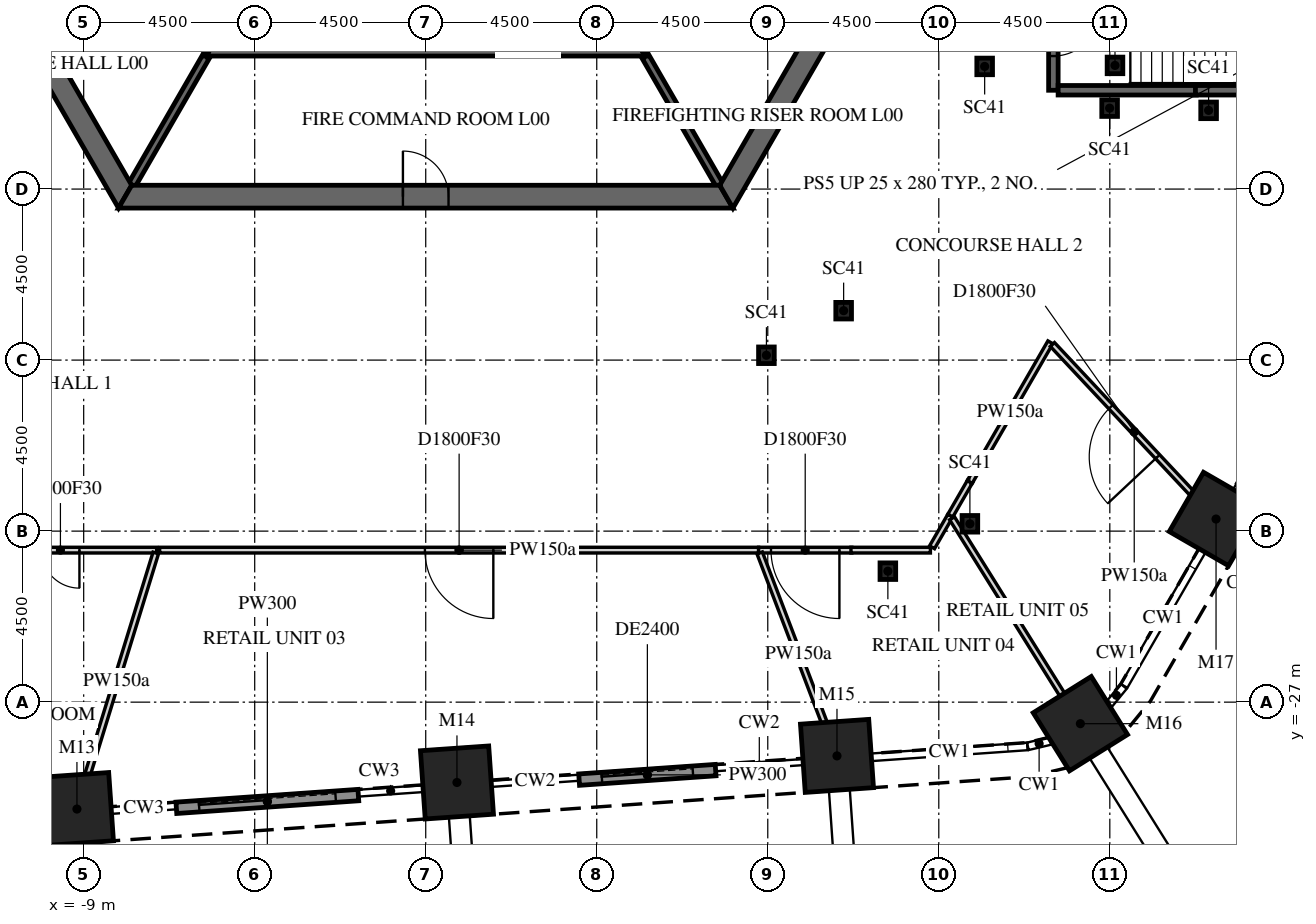
"""IFC4 building model, lengths in metres.
Left out: names, types, materials, properties, quantities, classifications, styles, units other than length and angle.
Written with IfcOpenShell. Run it as: python <this file> out.ifc"""

import sys

from ifc_helpers import new_model, si_unit, direction, frame, frame_2d, origin, origin_2d, place, context, subcontext, project, spatial, polyline, rectangle, i_section, outline, extrude, element, fill, save


model = new_model("IFC4")
c1 = context("Model", 3, precision=1e-05, world=origin(), true_north=direction((0.0, 1.0)))
c2 = subcontext(c1, "Body", "Model", "MODEL_VIEW")
j1 = project(units=[si_unit("LENGTHUNIT", "METRE"), si_unit("PLANEANGLEUNIT", "RADIAN")], contexts=[c1])
p1 = place(None, origin())
s1 = spatial("IfcSite", under=j1, at=p1, CompositionType="ELEMENT")
p2 = place(p1, origin())
s2 = spatial("IfcBuilding", under=s1, at=p2, CompositionType="ELEMENT")
p3 = place(p2, origin())
s3 = spatial("IfcBuildingStorey", under=s2, at=p3, CompositionType="ELEMENT", Elevation=0.0)
for number, where, z_axis, x_axis in (
    (1, (-9.177, -29.813, -2.1), (0.0, 0.0, 1.0), (-0.998, -0.07, 0.0)),
    (2, (0.822, -29.114, -2.1), (0.0, 0.0, 1.0), (-0.998, -0.07, 0.0)),
    (3, (10.821, -28.414, -2.1), (0.0, 0.0, 1.0), (-0.998, -0.07, 0.0)),
    (4, (17.225, -27.566, -2.1), (0.0, 0.0, 1.0), (-0.848, -0.53, 0.0)),
    (5, (20.795, -22.182, -2.1), (0.0, 0.0, 1.0), (-0.5, -0.866, 0.0)),
):
    element("IfcColumn", number, at=place(p3, frame(where, z_axis=z_axis, x_axis=x_axis)), inside=s3, PredefinedType="COLUMN", context=c2, shape_type="SweptSolid", body=[
        extrude(rectangle(XDim=1.8, YDim=1.8, at=origin_2d()), origin(), (0.0, 0.0, 1.0), 10.85),
    ])
for number, where, z_axis, x_axis in (
    (6, (20.599, -11.429, -2.1), (0.0, 0.0, 1.0), (1.0, 0.0, 0.0)),
    (7, (14.318, -22.308, -2.1), (0.0, 0.0, 1.0), (1.0, 0.0, 0.0)),
    (8, (10.996, -16.7, -2.1), (0.0, 0.0, 1.0), (1.0, 0.0, 0.0)),
    (9, (14.707, -10.273, -2.1), (0.0, 0.0, 1.0), (1.0, 0.0, 0.0)),
    (10, (18.136, -10.246, -2.1), (0.0, 0.0, 1.0), (1.0, 0.0, 0.0)),
    (11, (12.16, -23.554, -2.1), (0.0, 0.0, 1.0), (1.0, 0.0, 0.0)),
    (12, (8.965, -17.873, -2.1), (0.0, 0.0, 1.0), (1.0, 0.0, 0.0)),
    (13, (17.995, -11.37, -2.1), (0.0, 0.0, 1.0), (1.0, 0.0, 0.0)),
):
    element("IfcColumn", number, at=place(p3, frame(where, z_axis=z_axis, x_axis=x_axis)), inside=s3, PredefinedType="COLUMN", context=c2, shape_type="SweptSolid", body=[
        extrude(i_section(OverallWidth=0.412, OverallDepth=0.437, WebThickness=0.036, FlangeThickness=0.058, FilletRadius=0.015, at=origin_2d()), origin(), (0.0, 0.0, 1.0), 10.85),
    ])
p4 = place(p3, frame((-6.562, -29.78, 0.0), z_axis=(0.0, 0.0, 1.0), x_axis=(0.997562190208, 0.069783068626, 0.0)))
e14 = element("IfcWall", 14, at=p4, inside=s3, PredefinedType="SOLIDWALL", context=c2, shape_type="SweptSolid", body=[
    extrude(rectangle(XDim=4.8, YDim=0.3, at=frame_2d((2.4, 0.0))), origin(), (0.0, 0.0, 1.0), 7.823),
])
p5 = place(p4, frame((0.6, 0.0, 0.0)))
e15 = element("IfcOpeningElement", 15, at=p5, cuts=e14, PredefinedType="OPENING", context=c2, shape_type="SweptSolid", body=[
    extrude(rectangle(XDim=3.6, YDim=3.6, at=frame_2d((1.8, 1.8))), frame((0.0, 0.16, 0.0), z_axis=(0.0, -1.0, 0.0), x_axis=(1.0, 0.0, 0.0)), (0.0, 0.0, 1.0), 0.32),
])
p6 = place(p3, frame((4.036, -29.039, 0.0), z_axis=(0.0, 0.0, 1.0), x_axis=(0.997566661623, 0.069719119461, 0.0)))
e16 = element("IfcWall", 16, at=p6, inside=s3, PredefinedType="SOLIDWALL", context=c2, shape_type="SweptSolid", body=[
    extrude(rectangle(XDim=3.6, YDim=0.3, at=frame_2d((1.8, 0.0))), origin(), (0.0, 0.0, 1.0), 7.823),
])
p7 = place(p6, frame((0.6, 0.0, 0.0)))
e17 = element("IfcOpeningElement", 17, at=p7, cuts=e16, PredefinedType="OPENING", context=c2, shape_type="SweptSolid", body=[
    extrude(rectangle(XDim=2.4, YDim=3.0, at=frame_2d((1.2, 1.5))), frame((0.0, 0.16, 0.0), z_axis=(0.0, -1.0, 0.0), x_axis=(1.0, 0.0, 0.0)), (0.0, 0.0, 1.0), 0.32),
])
p8 = place(p3, frame((-15.819, 0.0, -2.1), z_axis=(0.0, 0.0, 1.0), x_axis=(0.499999880136, -0.866025472988, 0.0)))
e18 = element("IfcWall", 18, at=p8, inside=s3, PredefinedType="SHEAR", context=c2, shape_type="SweptSolid", body=[
    extrude(outline(polyline([(-0.173, -0.3), (15.993, -0.3), (15.646, 0.3), (0.173, 0.3), (-0.173, -0.3)])), origin(), (0.0, 0.0, 1.0), 10.85),
])
p9 = place(p8, frame((6.981, 0.0, 2.1)))
e19 = element("IfcOpeningElement", 19, at=p9, cuts=e18, PredefinedType="OPENING", context=c2, shape_type="SweptSolid", body=[
    extrude(rectangle(XDim=1.8, YDim=2.4, at=frame_2d((0.9, 1.2))), frame((0.0, 0.31, 0.0), z_axis=(0.0, -1.0, 0.0), x_axis=(1.0, 0.0, 0.0)), (0.0, 0.0, 1.0), 0.62),
])
p10 = place(p3, frame((-7.91, -13.7, -2.1), z_axis=(0.0, 0.0, 1.0), x_axis=(1.0, 0.0, 0.0)))
e20 = element("IfcWall", 20, at=p10, inside=s3, PredefinedType="SHEAR", context=c2, shape_type="SweptSolid", body=[
    extrude(outline(polyline([(-0.173, -0.3), (15.993, -0.3), (15.646, 0.3), (0.173, 0.3), (-0.173, -0.3)])), origin(), (0.0, 0.0, 1.0), 10.85),
])
p11 = place(p10, frame((7.31, 0.0, 2.1)))
e21 = element("IfcOpeningElement", 21, at=p11, cuts=e20, PredefinedType="OPENING", context=c2, shape_type="SweptSolid", body=[
    extrude(rectangle(XDim=1.2, YDim=2.4, at=frame_2d((0.6, 1.2))), frame((0.0, 0.31, 0.0), z_axis=(0.0, -1.0, 0.0), x_axis=(1.0, 0.0, 0.0)), (0.0, 0.0, 1.0), 0.62),
])
p12 = place(p3, frame((7.91, -13.7, -2.1), z_axis=(0.0, 0.0, 1.0), x_axis=(0.499999880136, 0.866025472988, 0.0)))
e22 = element("IfcWall", 22, at=p12, inside=s3, PredefinedType="SHEAR", context=c2, shape_type="SweptSolid", body=[
    extrude(outline(polyline([(-0.173, -0.3), (15.993, -0.3), (15.646, 0.3), (0.173, 0.3), (-0.173, -0.3)])), origin(), (0.0, 0.0, 1.0), 10.85),
])
p13 = place(p12, frame((7.039, 0.0, 2.1)))
e23 = element("IfcOpeningElement", 23, at=p13, cuts=e22, PredefinedType="OPENING", context=c2, shape_type="SweptSolid", body=[
    extrude(rectangle(XDim=1.8, YDim=2.4, at=frame_2d((0.9, 1.2))), frame((0.0, 0.31, 0.0), z_axis=(0.0, -1.0, 0.0), x_axis=(1.0, 0.0, 0.0)), (0.0, 0.0, 1.0), 0.62),
])
p14 = place(p3, frame((-11.345, 0.0, -2.1), z_axis=(0.0, 0.0, 1.0), x_axis=(0.499995046907, -0.866028263435, 0.0)))
e24 = element("IfcWall", 24, at=p14, inside=s3, PredefinedType="SHEAR", context=c2, shape_type="SweptSolid", body=[
    extrude(outline(polyline([(-0.101, -0.175), (11.446, -0.175), (11.244, 0.175), (0.101, 0.175), (-0.101, -0.175)])), origin(), (0.0, 0.0, 1.0), 10.85),
])
p15 = place(p14, frame((4.744, 0.0, 2.1)))
e25 = element("IfcOpeningElement", 25, at=p15, cuts=e24, PredefinedType="OPENING", context=c2, shape_type="SweptSolid", body=[
    extrude(rectangle(XDim=1.8, YDim=2.4, at=frame_2d((0.9, 1.2))), frame((0.0, 0.185, 0.0), z_axis=(0.0, -1.0, 0.0), x_axis=(1.0, 0.0, 0.0)), (0.0, 0.0, 1.0), 0.37),
])
p16 = place(p3, frame((-5.673, -9.825, -2.1), z_axis=(0.0, 0.0, 1.0), x_axis=(1.0, 0.0, 0.0)))
e26 = element("IfcWall", 26, at=p16, inside=s3, PredefinedType="SHEAR", context=c2, shape_type="SweptSolid", body=[
    extrude(outline(polyline([(-0.101, -0.175), (11.446, -0.175), (11.244, 0.175), (0.101, 0.175), (-0.101, -0.175)])), origin(), (0.0, 0.0, 1.0), 10.85),
])
p17 = place(p3, frame((5.673, -9.825, -2.1), z_axis=(0.0, 0.0, 1.0), x_axis=(0.499995046907, 0.866028263435, 0.0)))
e27 = element("IfcWall", 27, at=p17, inside=s3, PredefinedType="SHEAR", context=c2, shape_type="SweptSolid", body=[
    extrude(outline(polyline([(-0.101, -0.175), (11.446, -0.175), (11.244, 0.175), (0.101, 0.175), (-0.101, -0.175)])), origin(), (0.0, 0.0, 1.0), 10.85),
])
p18 = place(p17, frame((4.801, 0.0, 2.1)))
e28 = element("IfcOpeningElement", 28, at=p18, cuts=e27, PredefinedType="OPENING", context=c2, shape_type="SweptSolid", body=[
    extrude(rectangle(XDim=1.8, YDim=2.4, at=frame_2d((0.9, 1.2))), frame((0.0, 0.185, 0.0), z_axis=(0.0, -1.0, 0.0), x_axis=(1.0, 0.0, 0.0)), (0.0, 0.0, 1.0), 0.37),
])
for number, where, z_axis, x_axis in (
    (29, (-5.773, -10.0, -2.1), (0.0, 0.0, 1.0), (-0.5, -0.866, 0.0)),
    (30, (5.773, -10.0, -2.1), (0.0, 0.0, 1.0), (0.5, -0.866, 0.0)),
):
    element("IfcWall", number, at=place(p3, frame(where, z_axis=z_axis, x_axis=x_axis)), inside=s3, PredefinedType="SHEAR", context=c2, shape_type="SweptSolid", body=[
        extrude(rectangle(XDim=3.926, YDim=0.2, at=frame_2d((1.963, 0.0))), origin(), (0.0, 0.0, 1.0), 10.85),
    ])
p19 = place(p3, frame((-7.08, -23.0, 0.0), z_axis=(0.0, 0.0, 1.0), x_axis=(-1.0, 0.0, 0.0)))
e31 = element("IfcWall", 31, at=p19, inside=s3, PredefinedType="PARTITIONING", context=c2, shape_type="SweptSolid", body=[
    extrude(rectangle(XDim=5.064, YDim=0.15, at=frame_2d((2.532, 0.0))), origin(), (0.0, 0.0, 1.0), 8.75),
])
p20 = place(p19, frame((2.032, 0.0, 0.0)))
e32 = element("IfcOpeningElement", 32, at=p20, cuts=e31, PredefinedType="OPENING", context=c2, shape_type="SweptSolid", body=[
    extrude(rectangle(XDim=1.0, YDim=2.1, at=frame_2d((0.5, 1.05))), frame((0.0, 0.085, 0.0), z_axis=(0.0, -1.0, 0.0), x_axis=(1.0, 0.0, 0.0)), (0.0, 0.0, 1.0), 0.17),
])
p21 = place(p3, frame((-9.177, -29.813, 0.0), z_axis=(0.0, 0.0, 1.0), x_axis=(0.294180751952, 0.955749802606, 0.0)))
e33 = element("IfcWall", 33, at=p21, inside=s3, PredefinedType="PARTITIONING", context=c2, shape_type="SweptSolid", body=[
    extrude(rectangle(XDim=7.05, YDim=0.15, at=frame_2d((3.525, 0.0))), origin(), (0.0, 0.0, 1.0), 8.75),
])
p22 = place(p3, frame((8.759, -23.0, 0.0), z_axis=(0.0, 0.0, 1.0), x_axis=(-1.0, 0.0, 0.0)))
e34 = element("IfcWall", 34, at=p22, inside=s3, PredefinedType="PARTITIONING", context=c2, shape_type="SweptSolid", body=[
    extrude(rectangle(XDim=15.76, YDim=0.15, at=frame_2d((7.88, 0.0))), origin(), (0.0, 0.0, 1.0), 8.75),
])
p23 = place(p22, frame((6.98, 0.0, 0.0)))
e35 = element("IfcOpeningElement", 35, at=p23, cuts=e34, PredefinedType="OPENING", context=c2, shape_type="SweptSolid", body=[
    extrude(rectangle(XDim=1.8, YDim=2.1, at=frame_2d((0.9, 1.05))), frame((0.0, 0.085, 0.0), z_axis=(0.0, -1.0, 0.0), x_axis=(1.0, 0.0, 0.0)), (0.0, 0.0, 1.0), 0.17),
])
p24 = place(p3, frame((11.211, -23.0, 0.0), z_axis=(0.0, 0.0, 1.0), x_axis=(-1.0, 0.0, 0.0)))
e36 = element("IfcWall", 36, at=p24, inside=s3, PredefinedType="PARTITIONING", context=c2, shape_type="SweptSolid", body=[
    extrude(rectangle(XDim=2.452, YDim=0.15, at=frame_2d((1.226, 0.0))), origin(), (0.0, 0.0, 1.0), 8.75),
])
p25 = place(p24, frame((0.326, 0.0, 0.0)))
e37 = element("IfcOpeningElement", 37, at=p25, cuts=e36, PredefinedType="OPENING", context=c2, shape_type="SweptSolid", body=[
    extrude(rectangle(XDim=1.8, YDim=2.1, at=frame_2d((0.9, 1.05))), frame((0.0, 0.085, 0.0), z_axis=(0.0, -1.0, 0.0), x_axis=(1.0, 0.0, 0.0)), (0.0, 0.0, 1.0), 0.17),
])
p26 = place(p3, frame((10.821, -28.414, 0.0), z_axis=(0.0, 0.0, 1.0), x_axis=(-0.355918915631, 0.93451684067, 0.0)))
e38 = element("IfcWall", 38, at=p26, inside=s3, PredefinedType="PARTITIONING", context=c2, shape_type="SweptSolid", body=[
    extrude(rectangle(XDim=5.713, YDim=0.15, at=frame_2d((2.856, 0.0))), origin(), (0.0, 0.0, 1.0), 8.75),
])
p27 = place(p3, frame((11.189, -23.0, 0.0), z_axis=(0.0, 0.0, 1.0), x_axis=(1.0, 0.0, 0.0)))
e39 = element("IfcWall", 39, at=p27, inside=s3, PredefinedType="PARTITIONING", context=c2, shape_type="SweptSolid", body=[
    extrude(rectangle(XDim=2.09, YDim=0.15, at=frame_2d((1.045, 0.0))), origin(), (0.0, 0.0, 1.0), 8.75),
])
p28 = place(p3, frame((13.322, -22.925, 0.0), z_axis=(0.0, 0.0, 1.0), x_axis=(0.500146667959, 0.865940708438, 0.0)))
e40 = element("IfcWall", 40, at=p28, inside=s3, PredefinedType="PARTITIONING", context=c2, shape_type="SweptSolid", body=[
    extrude(rectangle(XDim=0.963, YDim=0.15, at=frame_2d((0.481, 0.0))), origin(), (0.0, 0.0, 1.0), 8.75),
])
p29 = place(p3, frame((13.804, -22.091, 0.0), z_axis=(0.0, 0.0, 1.0), x_axis=(0.499824022834, 0.866126980413, 0.0)))
e41 = element("IfcWall", 41, at=p29, inside=s3, PredefinedType="PARTITIONING", context=c2, shape_type="SweptSolid", body=[
    extrude(rectangle(XDim=1.04, YDim=0.15, at=frame_2d((0.52, 0.0))), origin(), (0.0, 0.0, 1.0), 8.75),
])
p30 = place(p3, frame((14.313, -21.209, 0.0), z_axis=(0.0, 0.0, 1.0), x_axis=(0.500022752519, 0.866012267213, 0.0)))
e42 = element("IfcWall", 42, at=p30, inside=s3, PredefinedType="PARTITIONING", context=c2, shape_type="SweptSolid", body=[
    extrude(rectangle(XDim=4.246, YDim=0.15, at=frame_2d((2.123, 0.0))), origin(), (0.0, 0.0, 1.0), 8.75),
])
p31 = place(p3, frame((20.795, -22.182, 0.0), z_axis=(0.0, 0.0, 1.0), x_axis=(-0.683915327737, 0.729561391856, 0.0)))
e43 = element("IfcWall", 43, at=p31, inside=s3, PredefinedType="PARTITIONING", context=c2, shape_type="SweptSolid", body=[
    extrude(rectangle(XDim=6.295, YDim=0.15, at=frame_2d((3.147, 0.0))), origin(), (0.0, 0.0, 1.0), 8.75),
])
p32 = place(p31, frame((2.248, 0.0, 0.0)))
e44 = element("IfcOpeningElement", 44, at=p32, cuts=e43, PredefinedType="OPENING", context=c2, shape_type="SweptSolid", body=[
    extrude(rectangle(XDim=1.8, YDim=2.1, at=frame_2d((0.9, 1.05))), frame((0.0, 0.085, 0.0), z_axis=(0.0, -1.0, 0.0), x_axis=(1.0, 0.0, 0.0)), (0.0, 0.0, 1.0), 0.17),
])
p33 = place(p3, frame((16.515, -7.7, 0.0), z_axis=(0.0, 0.0, 1.0), x_axis=(0.0, -1.0, 0.0)))
e45 = element("IfcWall", 45, at=p33, inside=s3, PredefinedType="PARTITIONING", context=c2, shape_type="SweptSolid", body=[
    extrude(rectangle(XDim=3.2, YDim=0.25, at=frame_2d((1.6, 0.0))), origin(), (0.0, 0.0, 1.0), 8.75),
])
p34 = place(p33, frame((1.1, 0.0, 0.0)))
e46 = element("IfcOpeningElement", 46, at=p34, cuts=e45, PredefinedType="OPENING", context=c2, shape_type="SweptSolid", body=[
    extrude(rectangle(XDim=1.2, YDim=2.1, at=frame_2d((0.6, 1.05))), frame((0.0, 0.135, 0.0), z_axis=(0.0, -1.0, 0.0), x_axis=(1.0, 0.0, 0.0)), (0.0, 0.0, 1.0), 0.27),
])
p35 = place(p3, frame((17.225, -27.566, 0.0), z_axis=(0.0, 0.0, 1.0), x_axis=(-0.529909376743, 0.848054274466, 0.0)))
e47 = element("IfcWall", 47, at=p35, inside=s3, PredefinedType="PARTITIONING", context=c2, shape_type="SweptSolid", body=[
    extrude(rectangle(XDim=6.371, YDim=0.15, at=frame_2d((3.186, 0.0))), origin(), (0.0, 0.0, 1.0), 7.988),
])
p36 = place(p3, frame((20.275, -10.9, 0.0), z_axis=(0.0, 0.0, 1.0), x_axis=(-1.0, 0.0, 0.0)))
e48 = element("IfcWall", 48, at=p36, inside=s3, PredefinedType="PARTITIONING", context=c2, shape_type="SweptSolid", body=[
    extrude(rectangle(XDim=3.635, YDim=0.25, at=frame_2d((1.817, 0.0))), origin(), (0.0, 0.0, 1.0), 8.75),
])
p37 = place(p3, frame((26.785, -10.9, 0.0), z_axis=(0.0, 0.0, 1.0), x_axis=(-1.0, 0.0, 0.0)))
e49 = element("IfcWall", 49, at=p37, inside=s3, PredefinedType="PARTITIONING", context=c2, shape_type="SweptSolid", body=[
    extrude(rectangle(XDim=6.532, YDim=0.25, at=frame_2d((3.266, 0.0))), origin(), (0.0, 0.0, 1.0), 8.75),
])
p38 = place(p5, frame((0.0, -0.025, 0.0)))
e50 = element("IfcDoor", 50, at=p38, inside=s3, OperationType="DOUBLE_DOOR_SLIDING", PredefinedType="DOOR", context=c2, shape_type="SweptSolid", body=[
    extrude(rectangle(XDim=3.6, YDim=3.6, at=frame_2d((1.8, 1.8))), frame((0.0, 0.025, 0.0), z_axis=(0.0, -1.0, 0.0), x_axis=(1.0, 0.0, 0.0)), (0.0, 0.0, 1.0), 0.05),
])
fill(e15, e50)
p39 = place(p7, frame((0.0, -0.025, 0.0)))
e51 = element("IfcDoor", 51, at=p39, inside=s3, OperationType="DOUBLE_DOOR_SLIDING", PredefinedType="DOOR", context=c2, shape_type="SweptSolid", body=[
    extrude(rectangle(XDim=2.4, YDim=3.0, at=frame_2d((1.2, 1.5))), frame((0.0, 0.025, 0.0), z_axis=(0.0, -1.0, 0.0), x_axis=(1.0, 0.0, 0.0)), (0.0, 0.0, 1.0), 0.05),
])
fill(e17, e51)
p40 = place(p11, origin())
e52 = element("IfcDoor", 52, at=p40, inside=s3, OperationType="SINGLE_SWING_LEFT", PredefinedType="DOOR", context=c2, shape_type="SweptSolid", body=[
    extrude(rectangle(XDim=1.2, YDim=2.4, at=frame_2d((0.6, 1.2))), frame((0.0, 0.025, 0.0), z_axis=(0.0, -1.0, 0.0), x_axis=(1.0, 0.0, 0.0)), (0.0, 0.0, 1.0), 0.05),
])
fill(e21, e52)
p41 = place(p20, origin())
e53 = element("IfcDoor", 53, at=p41, inside=s3, OperationType="SINGLE_SWING_RIGHT", PredefinedType="DOOR", context=c2, shape_type="SweptSolid", body=[
    extrude(rectangle(XDim=1.0, YDim=2.1, at=frame_2d((0.5, 1.05))), frame((0.0, 0.025, 0.0), z_axis=(0.0, -1.0, 0.0), x_axis=(1.0, 0.0, 0.0)), (0.0, 0.0, 1.0), 0.05),
])
fill(e32, e53)
p42 = place(p23, origin())
e54 = element("IfcDoor", 54, at=p42, inside=s3, OperationType="DOUBLE_DOOR_SINGLE_SWING", PredefinedType="DOOR", context=c2, shape_type="SweptSolid", body=[
    extrude(rectangle(XDim=1.8, YDim=2.1, at=frame_2d((0.9, 1.05))), frame((0.0, 0.025, 0.0), z_axis=(0.0, -1.0, 0.0), x_axis=(1.0, 0.0, 0.0)), (0.0, 0.0, 1.0), 0.05),
])
fill(e35, e54)
p43 = place(p25, origin())
e55 = element("IfcDoor", 55, at=p43, inside=s3, OperationType="DOUBLE_DOOR_SINGLE_SWING", PredefinedType="DOOR", context=c2, shape_type="SweptSolid", body=[
    extrude(rectangle(XDim=1.8, YDim=2.1, at=frame_2d((0.9, 1.05))), frame((0.0, 0.025, 0.0), z_axis=(0.0, -1.0, 0.0), x_axis=(1.0, 0.0, 0.0)), (0.0, 0.0, 1.0), 0.05),
])
fill(e37, e55)
p44 = place(p32, origin())
e56 = element("IfcDoor", 56, at=p44, inside=s3, OperationType="DOUBLE_DOOR_SINGLE_SWING", PredefinedType="DOOR", context=c2, shape_type="SweptSolid", body=[
    extrude(rectangle(XDim=1.8, YDim=2.1, at=frame_2d((0.9, 1.05))), frame((0.0, 0.025, 0.0), z_axis=(0.0, -1.0, 0.0), x_axis=(1.0, 0.0, 0.0)), (0.0, 0.0, 1.0), 0.05),
])
fill(e44, e56)
p45 = place(p34, origin())
e57 = element("IfcDoor", 57, at=p45, inside=s3, OperationType="SINGLE_SWING_LEFT", PredefinedType="DOOR", context=c2, shape_type="SweptSolid", body=[
    extrude(rectangle(XDim=1.2, YDim=2.1, at=frame_2d((0.6, 1.05))), frame((0.0, 0.025, 0.0), z_axis=(0.0, -1.0, 0.0), x_axis=(1.0, 0.0, 0.0)), (0.0, 0.0, 1.0), 0.05),
])
fill(e46, e57)
save(model, sys.argv[1])
